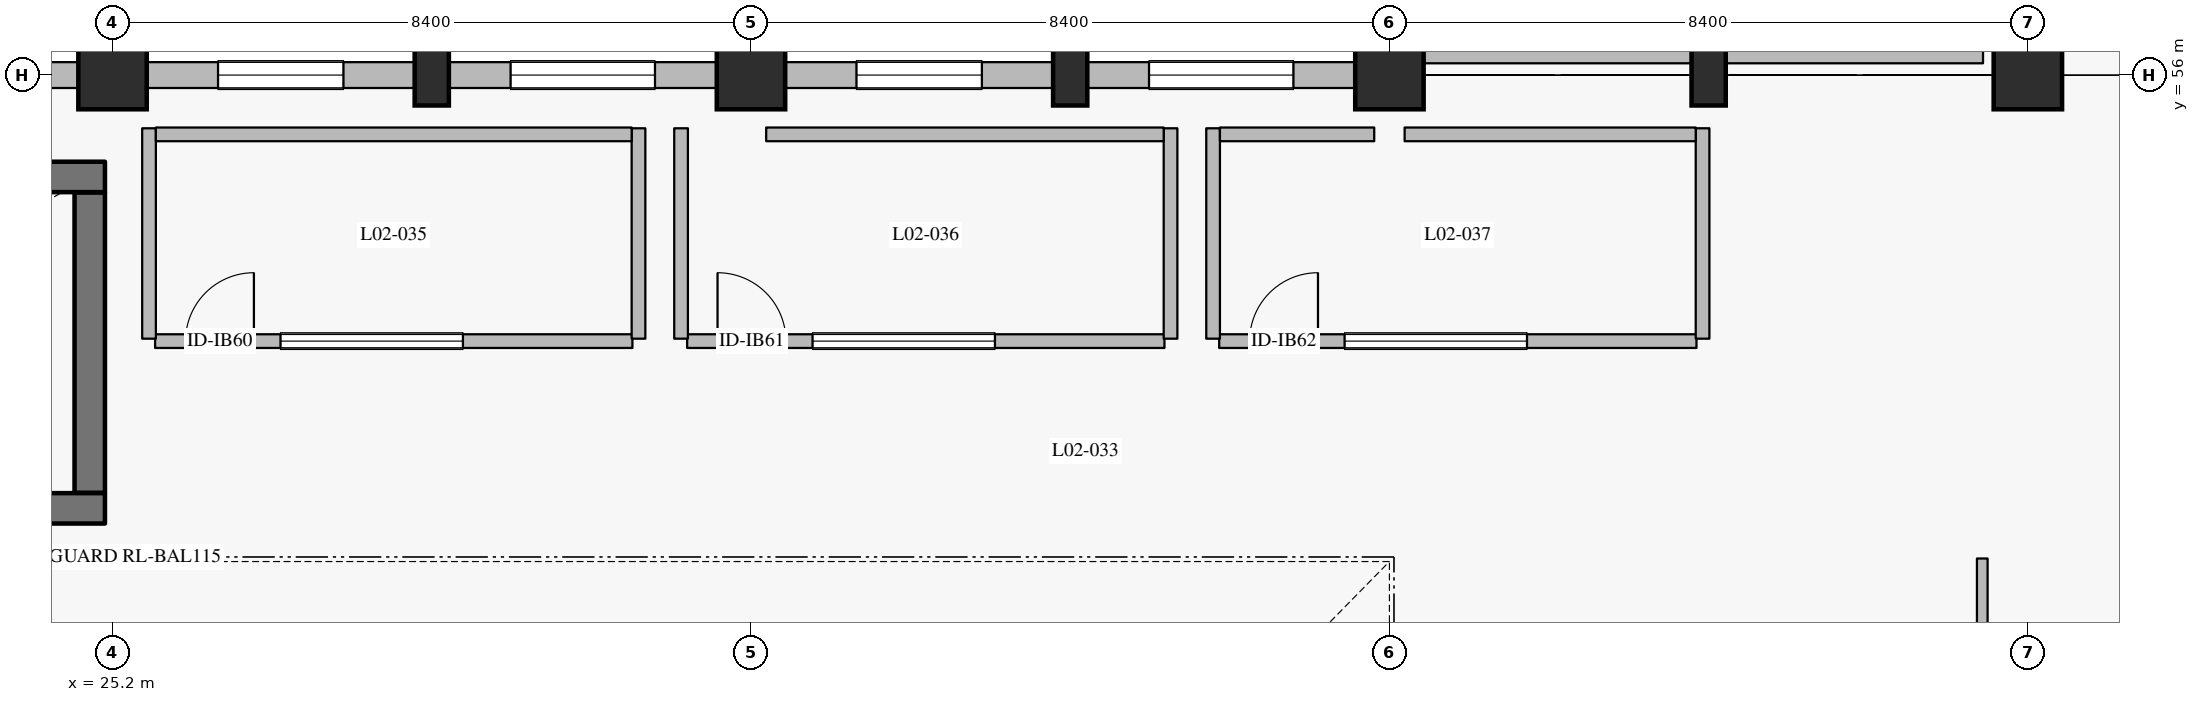
"""IFC4 building model, lengths in metres.
Left out: names, types, materials, properties, quantities, classifications, styles, units other than length and angle.
Written with IfcOpenShell. Run it as: python <this file> out.ifc"""

import sys

from ifc_helpers import new_model, si_unit, direction, frame, frame_2d, origin, origin_2d, place, context, subcontext, project, spatial, rectangle, extrude, element, fill, save


model = new_model("IFC4")
c1 = context("Model", 3, precision=1e-05, world=origin(), true_north=direction((0.0, 1.0)))
c2 = subcontext(c1, "Body", "Model", "MODEL_VIEW")
j1 = project(units=[si_unit("LENGTHUNIT", "METRE"), si_unit("PLANEANGLEUNIT", "RADIAN")], contexts=[c1])
p1 = place(None, origin())
s1 = spatial("IfcSite", under=j1, at=p1, CompositionType="ELEMENT")
p2 = place(p1, origin())
s2 = spatial("IfcBuilding", under=s1, at=p2, CompositionType="ELEMENT")
p3 = place(p2, frame((0.0, 0.0, 11.4)))
s3 = spatial("IfcBuildingStorey", under=s2, at=p3, CompositionType="ELEMENT", Elevation=11.4)
p4 = place(p3, frame((25.2, 56.0, 0.0), z_axis=(0.0, 0.0, 1.0), x_axis=(1.0, 0.0, 0.0)))
e1 = element("IfcColumn", 1, at=p4, inside=s3, PredefinedType="COLUMN", context=c2, shape_type="SweptSolid", body=[
    extrude(rectangle(XDim=0.9, YDim=0.9, at=origin_2d()), origin(), (0.0, 0.0, 1.0), 4.8),
])
p5 = place(p3, frame((29.4, 56.0, 0.0), z_axis=(0.0, 0.0, 1.0), x_axis=(1.0, 0.0, 0.0)))
e2 = element("IfcColumn", 2, at=p5, inside=s3, PredefinedType="PILASTER", context=c2, shape_type="SweptSolid", body=[
    extrude(rectangle(XDim=0.45, YDim=0.8, at=origin_2d()), origin(), (0.0, 0.0, 1.0), 4.8),
])
p6 = place(p3, frame((33.6, 56.0, 0.0), z_axis=(0.0, 0.0, 1.0), x_axis=(1.0, 0.0, 0.0)))
e3 = element("IfcColumn", 3, at=p6, inside=s3, PredefinedType="COLUMN", context=c2, shape_type="SweptSolid", body=[
    extrude(rectangle(XDim=0.9, YDim=0.9, at=origin_2d()), origin(), (0.0, 0.0, 1.0), 4.8),
])
p7 = place(p3, frame((37.8, 56.0, 0.0), z_axis=(0.0, 0.0, 1.0), x_axis=(1.0, 0.0, 0.0)))
e4 = element("IfcColumn", 4, at=p7, inside=s3, PredefinedType="PILASTER", context=c2, shape_type="SweptSolid", body=[
    extrude(rectangle(XDim=0.45, YDim=0.8, at=origin_2d()), origin(), (0.0, 0.0, 1.0), 4.8),
])
p8 = place(p3, frame((42.0, 56.0, 0.0), z_axis=(0.0, 0.0, 1.0), x_axis=(1.0, 0.0, 0.0)))
e5 = element("IfcColumn", 5, at=p8, inside=s3, PredefinedType="COLUMN", context=c2, shape_type="SweptSolid", body=[
    extrude(rectangle(XDim=0.9, YDim=0.9, at=origin_2d()), origin(), (0.0, 0.0, 1.0), 4.8),
])
p9 = place(p3, frame((46.2, 56.0, 0.0), z_axis=(0.0, 0.0, 1.0), x_axis=(1.0, 0.0, 0.0)))
e6 = element("IfcColumn", 6, at=p9, inside=s3, PredefinedType="PILASTER", context=c2, shape_type="SweptSolid", body=[
    extrude(rectangle(XDim=0.45, YDim=0.8, at=origin_2d()), origin(), (0.0, 0.0, 1.0), 4.8),
])
p10 = place(p3, frame((50.4, 56.0, 0.0), z_axis=(0.0, 0.0, 1.0), x_axis=(1.0, 0.0, 0.0)))
e7 = element("IfcColumn", 7, at=p10, inside=s3, PredefinedType="COLUMN", context=c2, shape_type="SweptSolid", body=[
    extrude(rectangle(XDim=0.9, YDim=0.9, at=origin_2d()), origin(), (0.0, 0.0, 1.0), 4.8),
])
p11 = place(p3, frame((21.225, 56.0, 0.0), z_axis=(0.0, 0.0, 1.0), x_axis=(1.0, 0.0, 0.0)))
e8 = element("IfcWall", 8, at=p11, inside=s3, PredefinedType="SOLIDWALL", context=c2, shape_type="SweptSolid", body=[
    extrude(rectangle(XDim=3.525, YDim=0.34, at=frame_2d((1.762, 0.0))), origin(), (0.0, 0.0, 1.0), 3.6),
])
p12 = place(p11, frame((0.812, 0.0, 1.25)))
e9 = element("IfcOpeningElement", 9, at=p12, cuts=e8, PredefinedType="OPENING", context=c2, shape_type="SweptSolid", body=[
    extrude(rectangle(XDim=1.9, YDim=1.4, at=frame_2d((0.95, 0.7))), frame((0.0, 0.18, 0.0), z_axis=(0.0, -1.0, 0.0), x_axis=(1.0, 0.0, 0.0)), (0.0, 0.0, 1.0), 0.36),
])
p13 = place(p3, frame((25.65, 56.0, 0.0), z_axis=(0.0, 0.0, 1.0), x_axis=(1.0, 0.0, 0.0)))
e10 = element("IfcWall", 10, at=p13, inside=s3, PredefinedType="SOLIDWALL", context=c2, shape_type="SweptSolid", body=[
    extrude(rectangle(XDim=3.525, YDim=0.34, at=frame_2d((1.763, 0.0))), origin(), (0.0, 0.0, 1.0), 3.6),
])
p14 = place(p13, frame((0.938, 0.0, 1.25)))
e11 = element("IfcOpeningElement", 11, at=p14, cuts=e10, PredefinedType="OPENING", context=c2, shape_type="SweptSolid", body=[
    extrude(rectangle(XDim=1.65, YDim=1.35, at=frame_2d((0.825, 0.675))), frame((0.0, 0.18, 0.0), z_axis=(0.0, -1.0, 0.0), x_axis=(1.0, 0.0, 0.0)), (0.0, 0.0, 1.0), 0.36),
])
p15 = place(p3, frame((29.625, 56.0, 0.0), z_axis=(0.0, 0.0, 1.0), x_axis=(1.0, 0.0, 0.0)))
e12 = element("IfcWall", 12, at=p15, inside=s3, PredefinedType="SOLIDWALL", context=c2, shape_type="SweptSolid", body=[
    extrude(rectangle(XDim=3.525, YDim=0.34, at=frame_2d((1.762, 0.0))), origin(), (0.0, 0.0, 1.0), 3.6),
])
p16 = place(p15, frame((0.812, 0.0, 1.25)))
e13 = element("IfcOpeningElement", 13, at=p16, cuts=e12, PredefinedType="OPENING", context=c2, shape_type="SweptSolid", body=[
    extrude(rectangle(XDim=1.9, YDim=1.4, at=frame_2d((0.95, 0.7))), frame((0.0, 0.18, 0.0), z_axis=(0.0, -1.0, 0.0), x_axis=(1.0, 0.0, 0.0)), (0.0, 0.0, 1.0), 0.36),
])
p17 = place(p3, frame((34.05, 56.0, 0.0), z_axis=(0.0, 0.0, 1.0), x_axis=(1.0, 0.0, 0.0)))
e14 = element("IfcWall", 14, at=p17, inside=s3, PredefinedType="SOLIDWALL", context=c2, shape_type="SweptSolid", body=[
    extrude(rectangle(XDim=3.525, YDim=0.34, at=frame_2d((1.762, 0.0))), origin(), (0.0, 0.0, 1.0), 3.6),
])
p18 = place(p17, frame((0.938, 0.0, 1.25)))
e15 = element("IfcOpeningElement", 15, at=p18, cuts=e14, PredefinedType="OPENING", context=c2, shape_type="SweptSolid", body=[
    extrude(rectangle(XDim=1.65, YDim=1.35, at=frame_2d((0.825, 0.675))), frame((0.0, 0.18, 0.0), z_axis=(0.0, -1.0, 0.0), x_axis=(1.0, 0.0, 0.0)), (0.0, 0.0, 1.0), 0.36),
])
p19 = place(p3, frame((38.025, 56.0, 0.0), z_axis=(0.0, 0.0, 1.0), x_axis=(1.0, 0.0, 0.0)))
e16 = element("IfcWall", 16, at=p19, inside=s3, PredefinedType="SOLIDWALL", context=c2, shape_type="SweptSolid", body=[
    extrude(rectangle(XDim=3.525, YDim=0.34, at=frame_2d((1.763, 0.0))), origin(), (0.0, 0.0, 1.0), 3.6),
])
p20 = place(p19, frame((0.812, 0.0, 1.25)))
e17 = element("IfcOpeningElement", 17, at=p20, cuts=e16, PredefinedType="OPENING", context=c2, shape_type="SweptSolid", body=[
    extrude(rectangle(XDim=1.9, YDim=1.4, at=frame_2d((0.95, 0.7))), frame((0.0, 0.18, 0.0), z_axis=(0.0, -1.0, 0.0), x_axis=(1.0, 0.0, 0.0)), (0.0, 0.0, 1.0), 0.36),
])
p21 = place(p3, frame((42.39, 56.25, 0.0), z_axis=(0.0, 0.0, 1.0), x_axis=(1.0, 0.0, 0.0)))
e18 = element("IfcWall", 18, at=p21, inside=s3, PredefinedType="PARAPET", context=c2, shape_type="SweptSolid", body=[
    extrude(rectangle(XDim=7.42, YDim=0.19, at=frame_2d((3.71, 0.0))), origin(), (0.0, 0.0, 1.0), 1.2),
])
p22 = place(p3, frame((16.9, 50.3, 0.0), z_axis=(0.0, 0.0, 1.0), x_axis=(1.0, 0.0, 0.0)))
e19 = element("IfcWall", 19, at=p22, inside=s3, PredefinedType="SHEAR", context=c2, shape_type="SweptSolid", body=[
    extrude(rectangle(XDim=8.2, YDim=0.4, at=frame_2d((4.1, 0.0))), origin(), (0.0, 0.0, 1.0), 4.535),
])
p23 = place(p3, frame((24.9, 50.505, 0.0), z_axis=(0.0, 0.0, 1.0), x_axis=(0.0, 1.0, 0.0)))
e20 = element("IfcWall", 20, at=p23, inside=s3, PredefinedType="SHEAR", context=c2, shape_type="SweptSolid", body=[
    extrude(rectangle(XDim=3.95, YDim=0.4, at=frame_2d((1.975, 0.0))), origin(), (0.0, 0.0, 1.0), 4.535),
])
p24 = place(p3, frame((16.9, 54.66, 0.0), z_axis=(0.0, 0.0, 1.0), x_axis=(1.0, 0.0, 0.0)))
e21 = element("IfcWall", 21, at=p24, inside=s3, PredefinedType="SHEAR", context=c2, shape_type="SweptSolid", body=[
    extrude(rectangle(XDim=8.2, YDim=0.4, at=frame_2d((4.1, 0.0))), origin(), (0.0, 0.0, 1.0), 4.535),
])
p25 = place(p3, frame((49.8, 15.56, 0.0), z_axis=(0.0, 0.0, 1.0), x_axis=(0.0, 1.0, 0.0)))
e22 = element("IfcWall", 22, at=p25, inside=s3, PredefinedType="PARTITIONING", context=c2, shape_type="SweptSolid", body=[
    extrude(rectangle(XDim=34.08, YDim=0.14, at=frame_2d((17.04, 0.0))), origin(), (0.0, 0.0, 1.0), 4.535),
])
p26 = place(p25, frame((12.92, 0.0, 0.0)))
e23 = element("IfcOpeningElement", 23, at=p26, cuts=e22, PredefinedType="OPENING", context=c2, shape_type="SweptSolid", body=[
    extrude(rectangle(XDim=1.9, YDim=2.4, at=frame_2d((0.95, 1.2))), frame((0.0, 0.08, 0.0), z_axis=(0.0, -1.0, 0.0), x_axis=(1.0, 0.0, 0.0)), (0.0, 0.0, 1.0), 0.16),
])
p27 = place(p3, frame((25.76, 52.5, 0.0), z_axis=(0.0, 0.0, 1.0), x_axis=(1.0, 0.0, 0.0)))
e24 = element("IfcWall", 24, at=p27, inside=s3, PredefinedType="PARTITIONING", context=c2, shape_type="SweptSolid", body=[
    extrude(rectangle(XDim=6.28, YDim=0.18, at=frame_2d((3.14, 0.0))), origin(), (0.0, 0.0, 1.0), 4.535),
])
p28 = place(p27, frame((0.4, 0.0, 0.0)))
e25 = element("IfcOpeningElement", 25, at=p28, cuts=e24, PredefinedType="OPENING", context=c2, shape_type="SweptSolid", body=[
    extrude(rectangle(XDim=0.9, YDim=2.1, at=frame_2d((0.45, 1.05))), frame((0.0, 0.1, 0.0), z_axis=(0.0, -1.0, 0.0), x_axis=(1.0, 0.0, 0.0)), (0.0, 0.0, 1.0), 0.2),
])
p29 = place(p27, frame((1.65, 0.0, 0.9)))
e26 = element("IfcOpeningElement", 26, at=p29, cuts=e24, PredefinedType="OPENING", context=c2, shape_type="SweptSolid", body=[
    extrude(rectangle(XDim=2.4, YDim=1.3, at=frame_2d((1.2, 0.65))), frame((0.0, 0.1, 0.0), z_axis=(0.0, -1.0, 0.0), x_axis=(1.0, 0.0, 0.0)), (0.0, 0.0, 1.0), 0.2),
])
p30 = place(p3, frame((32.76, 52.5, 0.0), z_axis=(0.0, 0.0, 1.0), x_axis=(1.0, 0.0, 0.0)))
e27 = element("IfcWall", 27, at=p30, inside=s3, PredefinedType="PARTITIONING", context=c2, shape_type="SweptSolid", body=[
    extrude(rectangle(XDim=6.28, YDim=0.18, at=frame_2d((3.14, 0.0))), origin(), (0.0, 0.0, 1.0), 4.535),
])
p31 = place(p30, frame((0.4, 0.0, 0.0)))
e28 = element("IfcOpeningElement", 28, at=p31, cuts=e27, PredefinedType="OPENING", context=c2, shape_type="SweptSolid", body=[
    extrude(rectangle(XDim=0.9, YDim=2.1, at=frame_2d((0.45, 1.05))), frame((0.0, 0.1, 0.0), z_axis=(0.0, -1.0, 0.0), x_axis=(1.0, 0.0, 0.0)), (0.0, 0.0, 1.0), 0.2),
])
p32 = place(p30, frame((1.65, 0.0, 0.9)))
e29 = element("IfcOpeningElement", 29, at=p32, cuts=e27, PredefinedType="OPENING", context=c2, shape_type="SweptSolid", body=[
    extrude(rectangle(XDim=2.4, YDim=1.3, at=frame_2d((1.2, 0.65))), frame((0.0, 0.1, 0.0), z_axis=(0.0, -1.0, 0.0), x_axis=(1.0, 0.0, 0.0)), (0.0, 0.0, 1.0), 0.2),
])
p33 = place(p3, frame((39.76, 52.5, 0.0), z_axis=(0.0, 0.0, 1.0), x_axis=(1.0, 0.0, 0.0)))
e30 = element("IfcWall", 30, at=p33, inside=s3, PredefinedType="PARTITIONING", context=c2, shape_type="SweptSolid", body=[
    extrude(rectangle(XDim=6.28, YDim=0.18, at=frame_2d((3.14, 0.0))), origin(), (0.0, 0.0, 1.0), 4.535),
])
p34 = place(p33, frame((0.4, 0.0, 0.0)))
e31 = element("IfcOpeningElement", 31, at=p34, cuts=e30, PredefinedType="OPENING", context=c2, shape_type="SweptSolid", body=[
    extrude(rectangle(XDim=0.9, YDim=2.1, at=frame_2d((0.45, 1.05))), frame((0.0, 0.1, 0.0), z_axis=(0.0, -1.0, 0.0), x_axis=(1.0, 0.0, 0.0)), (0.0, 0.0, 1.0), 0.2),
])
p35 = place(p33, frame((1.65, 0.0, 0.9)))
e32 = element("IfcOpeningElement", 32, at=p35, cuts=e30, PredefinedType="OPENING", context=c2, shape_type="SweptSolid", body=[
    extrude(rectangle(XDim=2.4, YDim=1.3, at=frame_2d((1.2, 0.65))), frame((0.0, 0.1, 0.0), z_axis=(0.0, -1.0, 0.0), x_axis=(1.0, 0.0, 0.0)), (0.0, 0.0, 1.0), 0.2),
])
for number, where, z_axis, x_axis in (
    (33, (25.68, 52.532, 0.0), (0.0, 0.0, 1.0), (0.0, 1.0, 0.0)),
    (34, (32.12, 52.532, 0.0), (0.0, 0.0, 1.0), (0.0, 1.0, 0.0)),
):
    element("IfcWall", number, at=place(p3, frame(where, z_axis=z_axis, x_axis=x_axis)), inside=s3, PredefinedType="PARTITIONING", context=c2, shape_type="SweptSolid", body=[
        extrude(rectangle(XDim=2.768, YDim=0.18, at=frame_2d((1.384, 0.0))), origin(), (0.0, 0.0, 1.0), 4.535),
    ])
p36 = place(p3, frame((25.77, 55.22, 0.0), z_axis=(0.0, 0.0, 1.0), x_axis=(1.0, 0.0, 0.0)))
e35 = element("IfcWall", 35, at=p36, inside=s3, PredefinedType="PARTITIONING", context=c2, shape_type="SweptSolid", body=[
    extrude(rectangle(XDim=6.26, YDim=0.18, at=frame_2d((3.13, 0.0))), origin(), (0.0, 0.0, 1.0), 4.535),
])
for number, where, z_axis, x_axis in (
    (36, (32.68, 52.532, 0.0), (0.0, 0.0, 1.0), (0.0, 1.0, 0.0)),
    (37, (39.12, 52.532, 0.0), (0.0, 0.0, 1.0), (0.0, 1.0, 0.0)),
):
    element("IfcWall", number, at=place(p3, frame(where, z_axis=z_axis, x_axis=x_axis)), inside=s3, PredefinedType="PARTITIONING", context=c2, shape_type="SweptSolid", body=[
        extrude(rectangle(XDim=2.768, YDim=0.18, at=frame_2d((1.384, 0.0))), origin(), (0.0, 0.0, 1.0), 4.535),
    ])
p37 = place(p3, frame((33.8, 55.22, 0.0), z_axis=(0.0, 0.0, 1.0), x_axis=(1.0, 0.0, 0.0)))
e38 = element("IfcWall", 38, at=p37, inside=s3, PredefinedType="PARTITIONING", context=c2, shape_type="SweptSolid", body=[
    extrude(rectangle(XDim=5.23, YDim=0.18, at=frame_2d((2.615, 0.0))), origin(), (0.0, 0.0, 1.0), 4.535),
])
for number, where, z_axis, x_axis in (
    (39, (39.68, 52.532, 0.0), (0.0, 0.0, 1.0), (0.0, 1.0, 0.0)),
    (40, (46.12, 52.532, 0.0), (0.0, 0.0, 1.0), (0.0, 1.0, 0.0)),
):
    element("IfcWall", number, at=place(p3, frame(where, z_axis=z_axis, x_axis=x_axis)), inside=s3, PredefinedType="PARTITIONING", context=c2, shape_type="SweptSolid", body=[
        extrude(rectangle(XDim=2.768, YDim=0.18, at=frame_2d((1.384, 0.0))), origin(), (0.0, 0.0, 1.0), 4.535),
    ])
p38 = place(p3, frame((39.77, 55.22, 0.0), z_axis=(0.0, 0.0, 1.0), x_axis=(1.0, 0.0, 0.0)))
e41 = element("IfcWall", 41, at=p38, inside=s3, PredefinedType="PARTITIONING", context=c2, shape_type="SweptSolid", body=[
    extrude(rectangle(XDim=2.03, YDim=0.18, at=frame_2d((1.015, 0.0))), origin(), (0.0, 0.0, 1.0), 4.535),
])
p39 = place(p3, frame((42.2, 55.22, 0.0), z_axis=(0.0, 0.0, 1.0), x_axis=(1.0, 0.0, 0.0)))
e42 = element("IfcWall", 42, at=p39, inside=s3, PredefinedType="PARTITIONING", context=c2, shape_type="SweptSolid", body=[
    extrude(rectangle(XDim=3.83, YDim=0.18, at=frame_2d((1.915, 0.0))), origin(), (0.0, 0.0, 1.0), 4.535),
])
p40 = place(p14, origin())
e43 = element("IfcWindow", 43, at=p40, inside=s3, PartitioningType="SINGLE_PANEL", PredefinedType="WINDOW", context=c2, shape_type="SweptSolid", body=[
    extrude(rectangle(XDim=1.65, YDim=1.35, at=frame_2d((0.825, 0.675))), frame((0.0, 0.03, 0.0), z_axis=(0.0, -1.0, 0.0), x_axis=(1.0, 0.0, 0.0)), (0.0, 0.0, 1.0), 0.06),
])
fill(e11, e43)
p41 = place(p16, origin())
e44 = element("IfcWindow", 44, at=p41, inside=s3, PartitioningType="DOUBLE_PANEL_VERTICAL", PredefinedType="WINDOW", context=c2, shape_type="SweptSolid", body=[
    extrude(rectangle(XDim=1.9, YDim=1.4, at=frame_2d((0.95, 0.7))), frame((0.0, 0.03, 0.0), z_axis=(0.0, -1.0, 0.0), x_axis=(1.0, 0.0, 0.0)), (0.0, 0.0, 1.0), 0.06),
])
fill(e13, e44)
p42 = place(p18, origin())
e45 = element("IfcWindow", 45, at=p42, inside=s3, PartitioningType="SINGLE_PANEL", PredefinedType="WINDOW", context=c2, shape_type="SweptSolid", body=[
    extrude(rectangle(XDim=1.65, YDim=1.35, at=frame_2d((0.825, 0.675))), frame((0.0, 0.03, 0.0), z_axis=(0.0, -1.0, 0.0), x_axis=(1.0, 0.0, 0.0)), (0.0, 0.0, 1.0), 0.06),
])
fill(e15, e45)
p43 = place(p20, origin())
e46 = element("IfcWindow", 46, at=p43, inside=s3, PartitioningType="DOUBLE_PANEL_VERTICAL", PredefinedType="WINDOW", context=c2, shape_type="SweptSolid", body=[
    extrude(rectangle(XDim=1.9, YDim=1.4, at=frame_2d((0.95, 0.7))), frame((0.0, 0.03, 0.0), z_axis=(0.0, -1.0, 0.0), x_axis=(1.0, 0.0, 0.0)), (0.0, 0.0, 1.0), 0.06),
])
fill(e17, e46)
p44 = place(p28, origin())
e47 = element("IfcDoor", 47, at=p44, inside=s3, OperationType="SINGLE_SWING_RIGHT", PredefinedType="DOOR", context=c2, shape_type="SweptSolid", body=[
    extrude(rectangle(XDim=0.9, YDim=2.1, at=frame_2d((0.45, 1.05))), frame((0.0, 0.025, 0.0), z_axis=(0.0, -1.0, 0.0), x_axis=(1.0, 0.0, 0.0)), (0.0, 0.0, 1.0), 0.05),
])
fill(e25, e47)
p45 = place(p29, origin())
e48 = element("IfcWindow", 48, at=p45, inside=s3, PartitioningType="DOUBLE_PANEL_VERTICAL", PredefinedType="WINDOW", context=c2, shape_type="SweptSolid", body=[
    extrude(rectangle(XDim=2.4, YDim=1.3, at=frame_2d((1.2, 0.65))), frame((0.0, 0.03, 0.0), z_axis=(0.0, -1.0, 0.0), x_axis=(1.0, 0.0, 0.0)), (0.0, 0.0, 1.0), 0.06),
])
fill(e26, e48)
p46 = place(p31, origin())
e49 = element("IfcDoor", 49, at=p46, inside=s3, OperationType="SINGLE_SWING_LEFT", PredefinedType="DOOR", context=c2, shape_type="SweptSolid", body=[
    extrude(rectangle(XDim=0.9, YDim=2.1, at=frame_2d((0.45, 1.05))), frame((0.0, 0.025, 0.0), z_axis=(0.0, -1.0, 0.0), x_axis=(1.0, 0.0, 0.0)), (0.0, 0.0, 1.0), 0.05),
])
fill(e28, e49)
p47 = place(p32, origin())
e50 = element("IfcWindow", 50, at=p47, inside=s3, PartitioningType="DOUBLE_PANEL_VERTICAL", PredefinedType="WINDOW", context=c2, shape_type="SweptSolid", body=[
    extrude(rectangle(XDim=2.4, YDim=1.3, at=frame_2d((1.2, 0.65))), frame((0.0, 0.03, 0.0), z_axis=(0.0, -1.0, 0.0), x_axis=(1.0, 0.0, 0.0)), (0.0, 0.0, 1.0), 0.06),
])
fill(e29, e50)
p48 = place(p34, origin())
e51 = element("IfcDoor", 51, at=p48, inside=s3, OperationType="SINGLE_SWING_RIGHT", PredefinedType="DOOR", context=c2, shape_type="SweptSolid", body=[
    extrude(rectangle(XDim=0.9, YDim=2.1, at=frame_2d((0.45, 1.05))), frame((0.0, 0.025, 0.0), z_axis=(0.0, -1.0, 0.0), x_axis=(1.0, 0.0, 0.0)), (0.0, 0.0, 1.0), 0.05),
])
fill(e31, e51)
p49 = place(p35, origin())
e52 = element("IfcWindow", 52, at=p49, inside=s3, PartitioningType="DOUBLE_PANEL_VERTICAL", PredefinedType="WINDOW", context=c2, shape_type="SweptSolid", body=[
    extrude(rectangle(XDim=2.4, YDim=1.3, at=frame_2d((1.2, 0.65))), frame((0.0, 0.03, 0.0), z_axis=(0.0, -1.0, 0.0), x_axis=(1.0, 0.0, 0.0)), (0.0, 0.0, 1.0), 0.06),
])
fill(e32, e52)
save(model, sys.argv[1])
